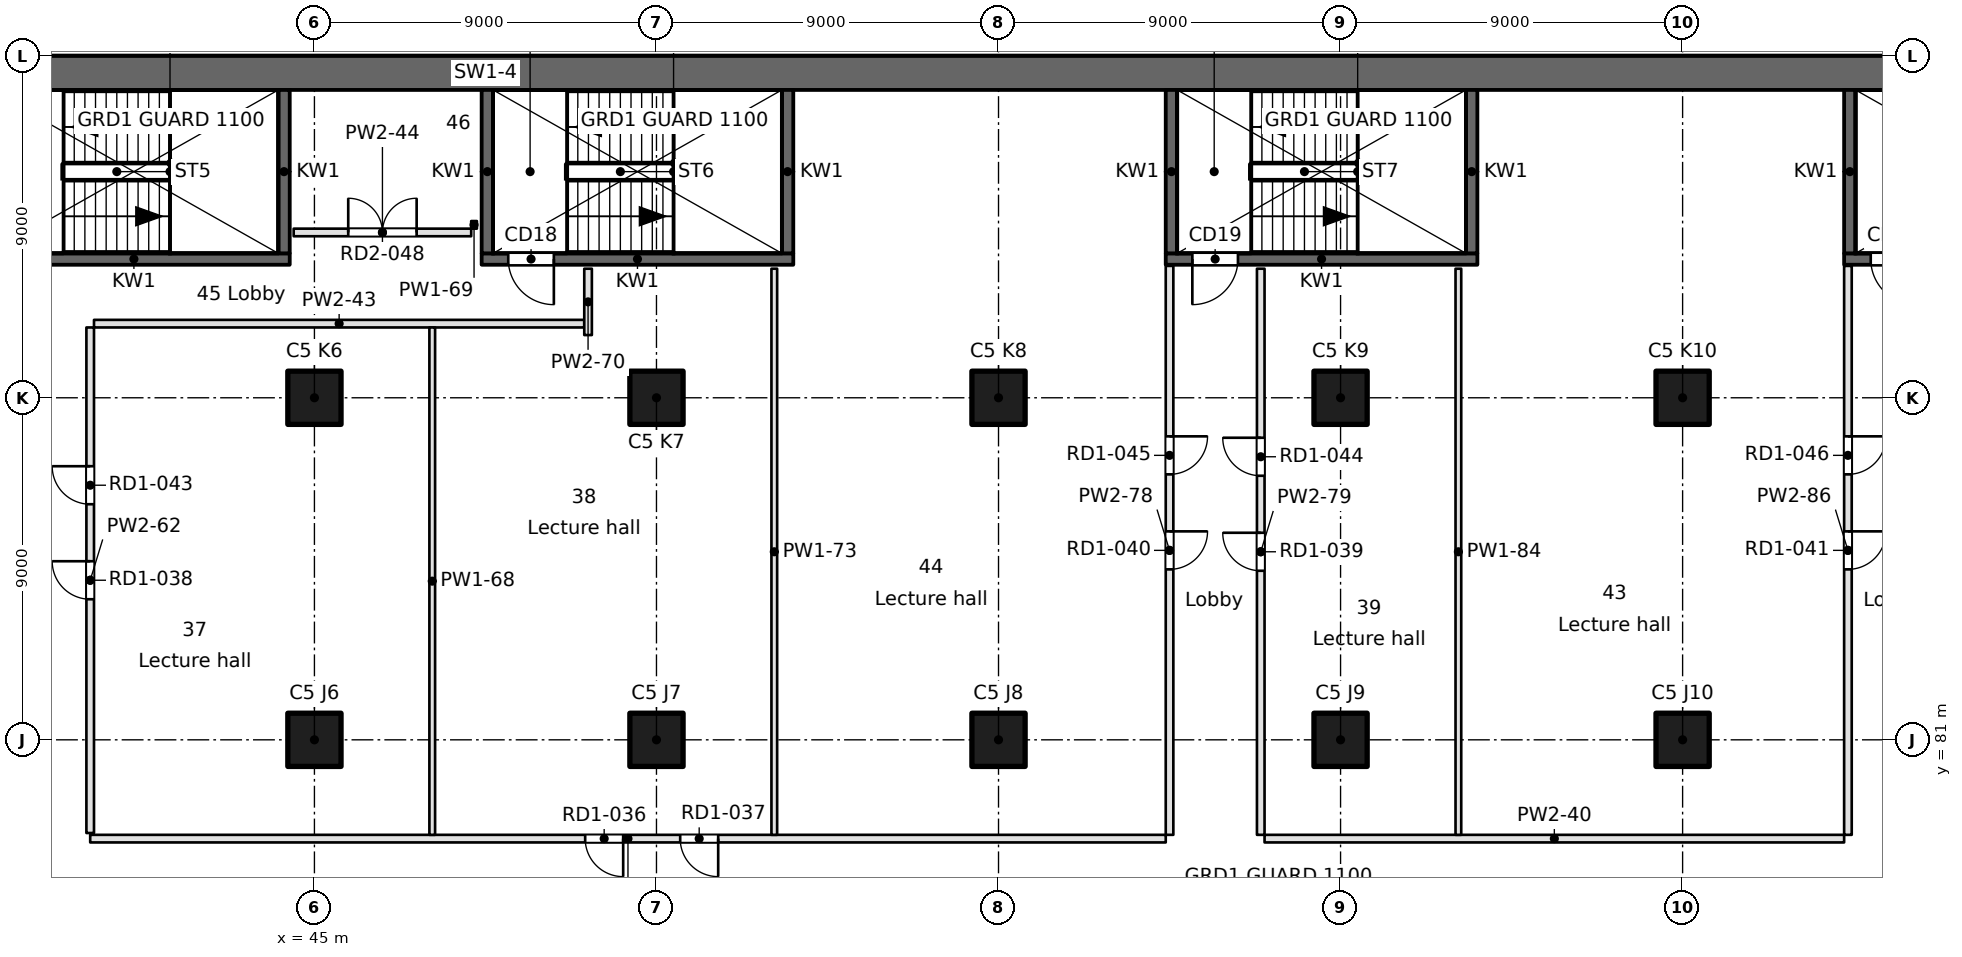
"""IFC4 building model, lengths in metres.
Left out: names, types, materials, properties, quantities, classifications, styles, units other than length and angle.
Written with IfcOpenShell. Run it as: python <this file> out.ifc"""

import sys

from ifc_helpers import new_model, si_unit, direction, frame, frame_2d, origin, origin_2d, place, context, subcontext, project, spatial, rectangle, extrude, element, fill, save


model = new_model("IFC4")
c1 = context("Model", 3, precision=1e-05, world=origin(), true_north=direction((0.0, 1.0)))
c2 = subcontext(c1, "Body", "Model", "MODEL_VIEW")
j1 = project(units=[si_unit("LENGTHUNIT", "METRE"), si_unit("PLANEANGLEUNIT", "RADIAN")], contexts=[c1])
p1 = place(None, origin())
s1 = spatial("IfcSite", under=j1, at=p1, CompositionType="ELEMENT")
p2 = place(p1, origin())
s2 = spatial("IfcBuilding", under=s1, at=p2, CompositionType="ELEMENT")
p3 = place(p2, frame((0.0, 0.0, 72.8)))
s3 = spatial("IfcBuildingStorey", under=s2, at=p3, CompositionType="ELEMENT", Elevation=72.8)
for number, where, z_axis, x_axis in (
    (1, (45.0, 81.0, 0.0), (0.0, 0.0, 1.0), (1.0, 0.0, 0.0)),
    (2, (45.0, 90.0, 0.0), (0.0, 0.0, 1.0), (1.0, 0.0, 0.0)),
    (3, (54.0, 81.0, 0.0), (0.0, 0.0, 1.0), (1.0, 0.0, 0.0)),
    (4, (54.0, 90.0, 0.0), (0.0, 0.0, 1.0), (1.0, 0.0, 0.0)),
    (5, (63.0, 81.0, 0.0), (0.0, 0.0, 1.0), (1.0, 0.0, 0.0)),
    (6, (63.0, 90.0, 0.0), (0.0, 0.0, 1.0), (1.0, 0.0, 0.0)),
    (7, (72.0, 81.0, 0.0), (0.0, 0.0, 1.0), (1.0, 0.0, 0.0)),
    (8, (72.0, 90.0, 0.0), (0.0, 0.0, 1.0), (1.0, 0.0, 0.0)),
    (9, (81.0, 81.0, 0.0), (0.0, 0.0, 1.0), (1.0, 0.0, 0.0)),
    (10, (81.0, 90.0, 0.0), (0.0, 0.0, 1.0), (1.0, 0.0, 0.0)),
):
    element("IfcColumn", number, at=place(p3, frame(where, z_axis=z_axis, x_axis=x_axis)), inside=s3, PredefinedType="COLUMN", context=c2, shape_type="SweptSolid", body=[
        extrude(rectangle(XDim=1.4, YDim=1.4, at=origin_2d()), origin(), (0.0, 0.0, 1.0), 3.7),
    ])
p4 = place(p3, frame((94.5, 98.55, 0.0), z_axis=(0.0, 0.0, 1.0), x_axis=(-1.0, 0.0, 0.0)))
e11 = element("IfcWall", 11, at=p4, inside=s3, PredefinedType="SHEAR", context=c2, shape_type="SweptSolid", body=[
    extrude(rectangle(XDim=90.0, YDim=0.9, at=frame_2d((45.0, 0.0))), origin(), (0.0, 0.0, 1.0), 3.7),
])
p5 = place(p3, frame((36.15, 93.65, -0.4), z_axis=(0.0, 0.0, 1.0), x_axis=(1.0, 0.0, 0.0)))
e12 = element("IfcWall", 12, at=p5, inside=s3, PredefinedType="SOLIDWALL", context=c2, shape_type="SweptSolid", body=[
    extrude(rectangle(XDim=8.2, YDim=0.3, at=frame_2d((4.1, 0.0))), origin(), (0.0, 0.0, 1.0), 3.7),
])
p6 = place(p5, frame((0.7, 0.0, 0.4)))
e13 = element("IfcOpeningElement", 13, at=p6, cuts=e12, PredefinedType="OPENING", context=c2, shape_type="SweptSolid", body=[
    extrude(rectangle(XDim=1.2, YDim=2.1, at=frame_2d((0.6, 1.05))), frame((0.0, 0.15, 0.0), z_axis=(0.0, -1.0, 0.0), x_axis=(1.0, 0.0, 0.0)), (0.0, 0.0, 1.0), 0.3),
])
p7 = place(p3, frame((49.4, 93.65, -0.4), z_axis=(0.0, 0.0, 1.0), x_axis=(1.0, 0.0, 0.0)))
e14 = element("IfcWall", 14, at=p7, inside=s3, PredefinedType="SOLIDWALL", context=c2, shape_type="SweptSolid", body=[
    extrude(rectangle(XDim=8.2, YDim=0.3, at=frame_2d((4.1, 0.0))), origin(), (0.0, 0.0, 1.0), 3.7),
])
p8 = place(p7, frame((0.7, 0.0, 0.4)))
e15 = element("IfcOpeningElement", 15, at=p8, cuts=e14, PredefinedType="OPENING", context=c2, shape_type="SweptSolid", body=[
    extrude(rectangle(XDim=1.2, YDim=2.1, at=frame_2d((0.6, 1.05))), frame((0.0, 0.15, 0.0), z_axis=(0.0, -1.0, 0.0), x_axis=(1.0, 0.0, 0.0)), (0.0, 0.0, 1.0), 0.3),
])
p9 = place(p3, frame((67.4, 93.65, -0.4), z_axis=(0.0, 0.0, 1.0), x_axis=(1.0, 0.0, 0.0)))
e16 = element("IfcWall", 16, at=p9, inside=s3, PredefinedType="SOLIDWALL", context=c2, shape_type="SweptSolid", body=[
    extrude(rectangle(XDim=8.2, YDim=0.3, at=frame_2d((4.1, 0.0))), origin(), (0.0, 0.0, 1.0), 3.7),
])
p10 = place(p9, frame((0.7, 0.0, 0.4)))
e17 = element("IfcOpeningElement", 17, at=p10, cuts=e16, PredefinedType="OPENING", context=c2, shape_type="SweptSolid", body=[
    extrude(rectangle(XDim=1.2, YDim=2.1, at=frame_2d((0.6, 1.05))), frame((0.0, 0.15, 0.0), z_axis=(0.0, -1.0, 0.0), x_axis=(1.0, 0.0, 0.0)), (0.0, 0.0, 1.0), 0.3),
])
p11 = place(p3, frame((85.25, 93.65, -0.4), z_axis=(0.0, 0.0, 1.0), x_axis=(1.0, 0.0, 0.0)))
e18 = element("IfcWall", 18, at=p11, inside=s3, PredefinedType="SOLIDWALL", context=c2, shape_type="SweptSolid", body=[
    extrude(rectangle(XDim=8.2, YDim=0.3, at=frame_2d((4.1, 0.0))), origin(), (0.0, 0.0, 1.0), 3.7),
])
p12 = place(p11, frame((0.7, 0.0, 0.4)))
e19 = element("IfcOpeningElement", 19, at=p12, cuts=e18, PredefinedType="OPENING", context=c2, shape_type="SweptSolid", body=[
    extrude(rectangle(XDim=1.2, YDim=2.1, at=frame_2d((0.6, 1.05))), frame((0.0, 0.15, 0.0), z_axis=(0.0, -1.0, 0.0), x_axis=(1.0, 0.0, 0.0)), (0.0, 0.0, 1.0), 0.3),
])
for number, where, z_axis, x_axis in (
    (20, (44.2, 93.8, -0.4), (0.0, 0.0, 1.0), (0.0, 1.0, 0.0)),
    (21, (49.55, 93.8, -0.4), (0.0, 0.0, 1.0), (0.0, 1.0, 0.0)),
    (22, (57.45, 93.8, -0.4), (0.0, 0.0, 1.0), (0.0, 1.0, 0.0)),
    (23, (67.55, 93.8, -0.4), (0.0, 0.0, 1.0), (0.0, 1.0, 0.0)),
    (24, (75.45, 93.8, -0.4), (0.0, 0.0, 1.0), (0.0, 1.0, 0.0)),
    (25, (85.4, 93.8, -0.4), (0.0, 0.0, 1.0), (0.0, 1.0, 0.0)),
):
    element("IfcWall", number, at=place(p3, frame(where, z_axis=z_axis, x_axis=x_axis)), inside=s3, PredefinedType="SOLIDWALL", context=c2, shape_type="SweptSolid", body=[
        extrude(rectangle(XDim=4.3, YDim=0.3, at=frame_2d((2.15, 0.0))), origin(), (0.0, 0.0, 1.0), 3.7),
    ])
p13 = place(p3, frame((39.1, 78.4, 0.0), z_axis=(0.0, 0.0, 1.0), x_axis=(1.0, 0.0, 0.0)))
e26 = element("IfcWall", 26, at=p13, inside=s3, PredefinedType="PARTITIONING", context=c2, shape_type="SweptSolid", body=[
    extrude(rectangle(XDim=28.3, YDim=0.2, at=frame_2d((14.15, 0.0))), origin(), (0.0, 0.0, 1.0), 3.3),
])
p14 = place(p13, frame((13.024, 0.0, 0.0)))
e27 = element("IfcOpeningElement", 27, at=p14, cuts=e26, PredefinedType="OPENING", context=c2, shape_type="SweptSolid", body=[
    extrude(rectangle(XDim=1.0, YDim=2.1, at=frame_2d((0.5, 1.05))), frame((0.0, 0.1, 0.0), z_axis=(0.0, -1.0, 0.0), x_axis=(1.0, 0.0, 0.0)), (0.0, 0.0, 1.0), 0.2),
])
p15 = place(p13, frame((15.524, 0.0, 0.0)))
e28 = element("IfcOpeningElement", 28, at=p15, cuts=e26, PredefinedType="OPENING", context=c2, shape_type="SweptSolid", body=[
    extrude(rectangle(XDim=1.0, YDim=2.1, at=frame_2d((0.5, 1.05))), frame((0.0, 0.1, 0.0), z_axis=(0.0, -1.0, 0.0), x_axis=(1.0, 0.0, 0.0)), (0.0, 0.0, 1.0), 0.2),
])
p16 = place(p3, frame((70.0, 78.4, 0.0), z_axis=(0.0, 0.0, 1.0), x_axis=(1.0, 0.0, 0.0)))
e29 = element("IfcWall", 29, at=p16, inside=s3, PredefinedType="PARTITIONING", context=c2, shape_type="SweptSolid", body=[
    extrude(rectangle(XDim=15.25, YDim=0.2, at=frame_2d((7.625, 0.0))), origin(), (0.0, 0.0, 1.0), 3.3),
])
p17 = place(p3, frame((52.1, 91.95, 0.0), z_axis=(0.0, 0.0, 1.0), x_axis=(-1.0, 0.0, 0.0)))
e30 = element("IfcWall", 30, at=p17, inside=s3, PredefinedType="PARTITIONING", context=c2, shape_type="SweptSolid", body=[
    extrude(rectangle(XDim=12.9, YDim=0.2, at=frame_2d((6.45, 0.0))), origin(), (0.0, 0.0, 1.0), 3.3),
])
p18 = place(p3, frame((44.454, 94.35, 0.0), z_axis=(0.0, 0.0, 1.0), x_axis=(1.0, 0.0, 0.0)))
e31 = element("IfcWall", 31, at=p18, inside=s3, PredefinedType="PARTITIONING", context=c2, shape_type="SweptSolid", body=[
    extrude(rectangle(XDim=4.671, YDim=0.2, at=frame_2d((2.335, 0.0))), origin(), (0.0, 0.0, 1.0), 3.3),
])
p19 = place(p18, frame((1.436, 0.0, 0.0)))
e32 = element("IfcOpeningElement", 32, at=p19, cuts=e31, PredefinedType="OPENING", context=c2, shape_type="SweptSolid", body=[
    extrude(rectangle(XDim=1.8, YDim=2.1, at=frame_2d((0.9, 1.05))), frame((0.0, 0.1, 0.0), z_axis=(0.0, -1.0, 0.0), x_axis=(1.0, 0.0, 0.0)), (0.0, 0.0, 1.0), 0.2),
])
p20 = place(p3, frame((39.1, 91.85, 0.0), z_axis=(0.0, 0.0, 1.0), x_axis=(0.0, -1.0, 0.0)))
e33 = element("IfcWall", 33, at=p20, inside=s3, PredefinedType="PARTITIONING", context=c2, shape_type="SweptSolid", body=[
    extrude(rectangle(XDim=13.302, YDim=0.2, at=frame_2d((6.651, 0.0))), origin(), (0.0, 0.0, 1.0), 3.3),
])
p21 = place(p20, frame((6.151, 0.0, 0.0)))
e34 = element("IfcOpeningElement", 34, at=p21, cuts=e33, PredefinedType="OPENING", context=c2, shape_type="SweptSolid", body=[
    extrude(rectangle(XDim=1.0, YDim=2.1, at=frame_2d((0.5, 1.05))), frame((0.0, 0.1, 0.0), z_axis=(0.0, -1.0, 0.0), x_axis=(1.0, 0.0, 0.0)), (0.0, 0.0, 1.0), 0.2),
])
p22 = place(p20, frame((3.651, 0.0, 0.0)))
e35 = element("IfcOpeningElement", 35, at=p22, cuts=e33, PredefinedType="OPENING", context=c2, shape_type="SweptSolid", body=[
    extrude(rectangle(XDim=1.0, YDim=2.1, at=frame_2d((0.5, 1.05))), frame((0.0, 0.1, 0.0), z_axis=(0.0, -1.0, 0.0), x_axis=(1.0, 0.0, 0.0)), (0.0, 0.0, 1.0), 0.2),
])
p23 = place(p3, frame((48.1, 91.85, 0.0), z_axis=(0.0, 0.0, 1.0), x_axis=(0.0, -1.0, 0.0)))
e36 = element("IfcWall", 36, at=p23, inside=s3, PredefinedType="PARTITIONING", context=c2, shape_type="SweptSolid", body=[
    extrude(rectangle(XDim=13.35, YDim=0.15, at=frame_2d((6.675, 0.0))), origin(), (0.0, 0.0, 1.0), 3.3),
])
p24 = place(p3, frame((49.2, 94.65, 0.0), z_axis=(0.0, 0.0, 1.0), x_axis=(0.0, -1.0, 0.0)))
e37 = element("IfcWall", 37, at=p24, inside=s3, PredefinedType="PARTITIONING", context=c2, shape_type="SweptSolid", body=[
    extrude(rectangle(XDim=0.2, YDim=0.15, at=frame_2d((0.1, 0.0))), origin(), (0.0, 0.0, 1.0), 3.3),
])
p25 = place(p3, frame((52.2, 93.396, 0.0), z_axis=(0.0, 0.0, 1.0), x_axis=(0.0, -1.0, 0.0)))
e38 = element("IfcWall", 38, at=p25, inside=s3, PredefinedType="PARTITIONING", context=c2, shape_type="SweptSolid", body=[
    extrude(rectangle(XDim=1.746, YDim=0.2, at=frame_2d((0.873, 0.0))), origin(), (0.0, 0.0, 1.0), 3.3),
])
p26 = place(p3, frame((57.1, 93.396, 0.0), z_axis=(0.0, 0.0, 1.0), x_axis=(0.0, -1.0, 0.0)))
e39 = element("IfcWall", 39, at=p26, inside=s3, PredefinedType="PARTITIONING", context=c2, shape_type="SweptSolid", body=[
    extrude(rectangle(XDim=14.896, YDim=0.15, at=frame_2d((7.448, 0.0))), origin(), (0.0, 0.0, 1.0), 3.3),
])
p27 = place(p3, frame((67.5, 78.5, 0.0), z_axis=(0.0, 0.0, 1.0), x_axis=(0.0, 1.0, 0.0)))
e40 = element("IfcWall", 40, at=p27, inside=s3, PredefinedType="PARTITIONING", context=c2, shape_type="SweptSolid", body=[
    extrude(rectangle(XDim=14.97, YDim=0.2, at=frame_2d((7.485, 0.0))), origin(), (0.0, 0.0, 1.0), 3.3),
])
p28 = place(p27, frame((6.985, 0.0, 0.0)))
e41 = element("IfcOpeningElement", 41, at=p28, cuts=e40, PredefinedType="OPENING", context=c2, shape_type="SweptSolid", body=[
    extrude(rectangle(XDim=1.0, YDim=2.1, at=frame_2d((0.5, 1.05))), frame((0.0, 0.1, 0.0), z_axis=(0.0, -1.0, 0.0), x_axis=(1.0, 0.0, 0.0)), (0.0, 0.0, 1.0), 0.2),
])
p29 = place(p27, frame((9.485, 0.0, 0.0)))
e42 = element("IfcOpeningElement", 42, at=p29, cuts=e40, PredefinedType="OPENING", context=c2, shape_type="SweptSolid", body=[
    extrude(rectangle(XDim=1.0, YDim=2.1, at=frame_2d((0.5, 1.05))), frame((0.0, 0.1, 0.0), z_axis=(0.0, -1.0, 0.0), x_axis=(1.0, 0.0, 0.0)), (0.0, 0.0, 1.0), 0.2),
])
p30 = place(p3, frame((69.9, 93.396, 0.0), z_axis=(0.0, 0.0, 1.0), x_axis=(0.0, -1.0, 0.0)))
e43 = element("IfcWall", 43, at=p30, inside=s3, PredefinedType="PARTITIONING", context=c2, shape_type="SweptSolid", body=[
    extrude(rectangle(XDim=14.896, YDim=0.2, at=frame_2d((7.448, 0.0))), origin(), (0.0, 0.0, 1.0), 3.3),
])
p31 = place(p30, frame((6.948, 0.0, 0.0)))
e44 = element("IfcOpeningElement", 44, at=p31, cuts=e43, PredefinedType="OPENING", context=c2, shape_type="SweptSolid", body=[
    extrude(rectangle(XDim=1.0, YDim=2.1, at=frame_2d((0.5, 1.05))), frame((0.0, 0.1, 0.0), z_axis=(0.0, -1.0, 0.0), x_axis=(1.0, 0.0, 0.0)), (0.0, 0.0, 1.0), 0.2),
])
p32 = place(p30, frame((4.448, 0.0, 0.0)))
e45 = element("IfcOpeningElement", 45, at=p32, cuts=e43, PredefinedType="OPENING", context=c2, shape_type="SweptSolid", body=[
    extrude(rectangle(XDim=1.0, YDim=2.1, at=frame_2d((0.5, 1.05))), frame((0.0, 0.1, 0.0), z_axis=(0.0, -1.0, 0.0), x_axis=(1.0, 0.0, 0.0)), (0.0, 0.0, 1.0), 0.2),
])
p33 = place(p3, frame((75.1, 93.396, 0.0), z_axis=(0.0, 0.0, 1.0), x_axis=(0.0, -1.0, 0.0)))
e46 = element("IfcWall", 46, at=p33, inside=s3, PredefinedType="PARTITIONING", context=c2, shape_type="SweptSolid", body=[
    extrude(rectangle(XDim=14.896, YDim=0.15, at=frame_2d((7.448, 0.0))), origin(), (0.0, 0.0, 1.0), 3.3),
])
p34 = place(p3, frame((85.35, 78.5, 0.0), z_axis=(0.0, 0.0, 1.0), x_axis=(0.0, 1.0, 0.0)))
e47 = element("IfcWall", 47, at=p34, inside=s3, PredefinedType="PARTITIONING", context=c2, shape_type="SweptSolid", body=[
    extrude(rectangle(XDim=14.97, YDim=0.2, at=frame_2d((7.485, 0.0))), origin(), (0.0, 0.0, 1.0), 3.3),
])
p35 = place(p34, frame((6.985, 0.0, 0.0)))
e48 = element("IfcOpeningElement", 48, at=p35, cuts=e47, PredefinedType="OPENING", context=c2, shape_type="SweptSolid", body=[
    extrude(rectangle(XDim=1.0, YDim=2.1, at=frame_2d((0.5, 1.05))), frame((0.0, 0.1, 0.0), z_axis=(0.0, -1.0, 0.0), x_axis=(1.0, 0.0, 0.0)), (0.0, 0.0, 1.0), 0.2),
])
p36 = place(p34, frame((9.485, 0.0, 0.0)))
e49 = element("IfcOpeningElement", 49, at=p36, cuts=e47, PredefinedType="OPENING", context=c2, shape_type="SweptSolid", body=[
    extrude(rectangle(XDim=1.0, YDim=2.1, at=frame_2d((0.5, 1.05))), frame((0.0, 0.1, 0.0), z_axis=(0.0, -1.0, 0.0), x_axis=(1.0, 0.0, 0.0)), (0.0, 0.0, 1.0), 0.2),
])
p37 = place(p8, frame((1.2, 0.0, 0.0), z_axis=(0.0, 0.0, 1.0), x_axis=(-1.0, 0.0, 0.0)))
e50 = element("IfcDoor", 50, at=p37, inside=s3, OperationType="SINGLE_SWING_LEFT", PredefinedType="DOOR", context=c2, shape_type="SweptSolid", body=[
    extrude(rectangle(XDim=1.2, YDim=2.1, at=frame_2d((0.6, 1.05))), frame((0.0, 0.025, 0.0), z_axis=(0.0, -1.0, 0.0), x_axis=(1.0, 0.0, 0.0)), (0.0, 0.0, 1.0), 0.05),
])
fill(e15, e50)
p38 = place(p10, frame((1.2, 0.0, 0.0), z_axis=(0.0, 0.0, 1.0), x_axis=(-1.0, 0.0, 0.0)))
e51 = element("IfcDoor", 51, at=p38, inside=s3, OperationType="SINGLE_SWING_RIGHT", PredefinedType="DOOR", context=c2, shape_type="SweptSolid", body=[
    extrude(rectangle(XDim=1.2, YDim=2.1, at=frame_2d((0.6, 1.05))), frame((0.0, 0.025, 0.0), z_axis=(0.0, -1.0, 0.0), x_axis=(1.0, 0.0, 0.0)), (0.0, 0.0, 1.0), 0.05),
])
fill(e17, e51)
p39 = place(p12, frame((1.2, 0.0, 0.0), z_axis=(0.0, 0.0, 1.0), x_axis=(-1.0, 0.0, 0.0)))
e52 = element("IfcDoor", 52, at=p39, inside=s3, OperationType="SINGLE_SWING_LEFT", PredefinedType="DOOR", context=c2, shape_type="SweptSolid", body=[
    extrude(rectangle(XDim=1.2, YDim=2.1, at=frame_2d((0.6, 1.05))), frame((0.0, 0.025, 0.0), z_axis=(0.0, -1.0, 0.0), x_axis=(1.0, 0.0, 0.0)), (0.0, 0.0, 1.0), 0.05),
])
fill(e19, e52)
p40 = place(p14, frame((1.0, 0.0, 0.0), z_axis=(0.0, 0.0, 1.0), x_axis=(-1.0, 0.0, 0.0)))
e53 = element("IfcDoor", 53, at=p40, inside=s3, OperationType="SINGLE_SWING_LEFT", PredefinedType="DOOR", context=c2, shape_type="SweptSolid", body=[
    extrude(rectangle(XDim=1.0, YDim=2.1, at=frame_2d((0.5, 1.05))), frame((0.0, 0.025, 0.0), z_axis=(0.0, -1.0, 0.0), x_axis=(1.0, 0.0, 0.0)), (0.0, 0.0, 1.0), 0.05),
])
fill(e27, e53)
p41 = place(p15, frame((1.0, 0.0, 0.0), z_axis=(0.0, 0.0, 1.0), x_axis=(-1.0, 0.0, 0.0)))
e54 = element("IfcDoor", 54, at=p41, inside=s3, OperationType="SINGLE_SWING_LEFT", PredefinedType="DOOR", context=c2, shape_type="SweptSolid", body=[
    extrude(rectangle(XDim=1.0, YDim=2.1, at=frame_2d((0.5, 1.05))), frame((0.0, 0.025, 0.0), z_axis=(0.0, -1.0, 0.0), x_axis=(1.0, 0.0, 0.0)), (0.0, 0.0, 1.0), 0.05),
])
fill(e28, e54)
p42 = place(p21, frame((1.0, 0.0, 0.0), z_axis=(0.0, 0.0, 1.0), x_axis=(-1.0, 0.0, 0.0)))
e55 = element("IfcDoor", 55, at=p42, inside=s3, OperationType="SINGLE_SWING_RIGHT", PredefinedType="DOOR", context=c2, shape_type="SweptSolid", body=[
    extrude(rectangle(XDim=1.0, YDim=2.1, at=frame_2d((0.5, 1.05))), frame((0.0, 0.025, 0.0), z_axis=(0.0, -1.0, 0.0), x_axis=(1.0, 0.0, 0.0)), (0.0, 0.0, 1.0), 0.05),
])
fill(e34, e55)
p43 = place(p31, frame((1.0, 0.0, 0.0), z_axis=(0.0, 0.0, 1.0), x_axis=(-1.0, 0.0, 0.0)))
e56 = element("IfcDoor", 56, at=p43, inside=s3, OperationType="SINGLE_SWING_RIGHT", PredefinedType="DOOR", context=c2, shape_type="SweptSolid", body=[
    extrude(rectangle(XDim=1.0, YDim=2.1, at=frame_2d((0.5, 1.05))), frame((0.0, 0.025, 0.0), z_axis=(0.0, -1.0, 0.0), x_axis=(1.0, 0.0, 0.0)), (0.0, 0.0, 1.0), 0.05),
])
fill(e44, e56)
p44 = place(p28, frame((1.0, 0.0, 0.0), z_axis=(0.0, 0.0, 1.0), x_axis=(-1.0, 0.0, 0.0)))
e57 = element("IfcDoor", 57, at=p44, inside=s3, OperationType="SINGLE_SWING_LEFT", PredefinedType="DOOR", context=c2, shape_type="SweptSolid", body=[
    extrude(rectangle(XDim=1.0, YDim=2.1, at=frame_2d((0.5, 1.05))), frame((0.0, 0.025, 0.0), z_axis=(0.0, -1.0, 0.0), x_axis=(1.0, 0.0, 0.0)), (0.0, 0.0, 1.0), 0.05),
])
fill(e41, e57)
p45 = place(p35, frame((1.0, 0.0, 0.0), z_axis=(0.0, 0.0, 1.0), x_axis=(-1.0, 0.0, 0.0)))
e58 = element("IfcDoor", 58, at=p45, inside=s3, OperationType="SINGLE_SWING_LEFT", PredefinedType="DOOR", context=c2, shape_type="SweptSolid", body=[
    extrude(rectangle(XDim=1.0, YDim=2.1, at=frame_2d((0.5, 1.05))), frame((0.0, 0.025, 0.0), z_axis=(0.0, -1.0, 0.0), x_axis=(1.0, 0.0, 0.0)), (0.0, 0.0, 1.0), 0.05),
])
fill(e48, e58)
p46 = place(p22, frame((1.0, 0.0, 0.0), z_axis=(0.0, 0.0, 1.0), x_axis=(-1.0, 0.0, 0.0)))
e59 = element("IfcDoor", 59, at=p46, inside=s3, OperationType="SINGLE_SWING_RIGHT", PredefinedType="DOOR", context=c2, shape_type="SweptSolid", body=[
    extrude(rectangle(XDim=1.0, YDim=2.1, at=frame_2d((0.5, 1.05))), frame((0.0, 0.025, 0.0), z_axis=(0.0, -1.0, 0.0), x_axis=(1.0, 0.0, 0.0)), (0.0, 0.0, 1.0), 0.05),
])
fill(e35, e59)
p47 = place(p32, frame((1.0, 0.0, 0.0), z_axis=(0.0, 0.0, 1.0), x_axis=(-1.0, 0.0, 0.0)))
e60 = element("IfcDoor", 60, at=p47, inside=s3, OperationType="SINGLE_SWING_RIGHT", PredefinedType="DOOR", context=c2, shape_type="SweptSolid", body=[
    extrude(rectangle(XDim=1.0, YDim=2.1, at=frame_2d((0.5, 1.05))), frame((0.0, 0.025, 0.0), z_axis=(0.0, -1.0, 0.0), x_axis=(1.0, 0.0, 0.0)), (0.0, 0.0, 1.0), 0.05),
])
fill(e45, e60)
p48 = place(p29, frame((1.0, 0.0, 0.0), z_axis=(0.0, 0.0, 1.0), x_axis=(-1.0, 0.0, 0.0)))
e61 = element("IfcDoor", 61, at=p48, inside=s3, OperationType="SINGLE_SWING_LEFT", PredefinedType="DOOR", context=c2, shape_type="SweptSolid", body=[
    extrude(rectangle(XDim=1.0, YDim=2.1, at=frame_2d((0.5, 1.05))), frame((0.0, 0.025, 0.0), z_axis=(0.0, -1.0, 0.0), x_axis=(1.0, 0.0, 0.0)), (0.0, 0.0, 1.0), 0.05),
])
fill(e42, e61)
p49 = place(p36, frame((1.0, 0.0, 0.0), z_axis=(0.0, 0.0, 1.0), x_axis=(-1.0, 0.0, 0.0)))
e62 = element("IfcDoor", 62, at=p49, inside=s3, OperationType="SINGLE_SWING_LEFT", PredefinedType="DOOR", context=c2, shape_type="SweptSolid", body=[
    extrude(rectangle(XDim=1.0, YDim=2.1, at=frame_2d((0.5, 1.05))), frame((0.0, 0.025, 0.0), z_axis=(0.0, -1.0, 0.0), x_axis=(1.0, 0.0, 0.0)), (0.0, 0.0, 1.0), 0.05),
])
fill(e49, e62)
p50 = place(p19, origin())
e63 = element("IfcDoor", 63, at=p50, inside=s3, OperationType="DOUBLE_DOOR_SINGLE_SWING", PredefinedType="DOOR", context=c2, shape_type="SweptSolid", body=[
    extrude(rectangle(XDim=1.8, YDim=2.1, at=frame_2d((0.9, 1.05))), frame((0.0, 0.025, 0.0), z_axis=(0.0, -1.0, 0.0), x_axis=(1.0, 0.0, 0.0)), (0.0, 0.0, 1.0), 0.05),
])
fill(e32, e63)
save(model, sys.argv[1])
